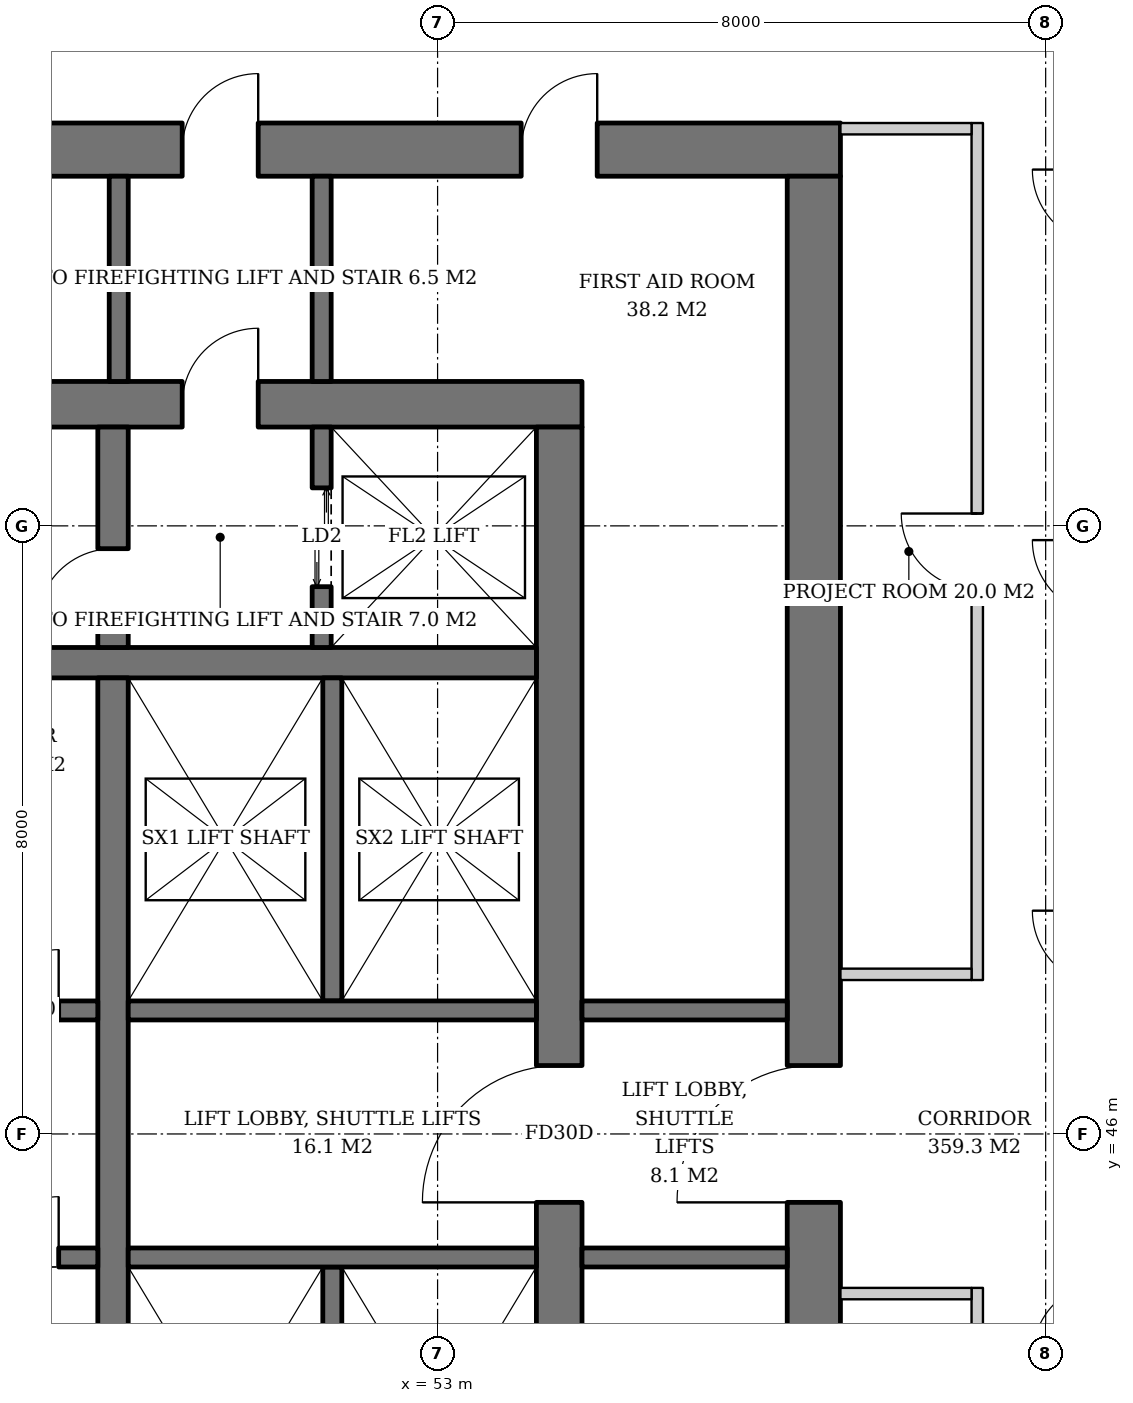
"""IFC4 building model, lengths in metres.
Left out: names, types, materials, properties, quantities, classifications, styles, units other than length and angle.
Written with IfcOpenShell. Run it as: python <this file> out.ifc"""

import sys

from ifc_helpers import new_model, si_unit, direction, frame, frame_2d, origin, place, context, subcontext, project, spatial, rectangle, extrude, element, fill, save


model = new_model("IFC4")
c1 = context("Model", 3, precision=1e-05, world=origin(), true_north=direction((0.0, 1.0)))
c2 = subcontext(c1, "Body", "Model", "MODEL_VIEW")
j1 = project(units=[si_unit("LENGTHUNIT", "METRE"), si_unit("PLANEANGLEUNIT", "RADIAN")], contexts=[c1])
p1 = place(None, origin())
s1 = spatial("IfcSite", under=j1, at=p1, CompositionType="ELEMENT")
p2 = place(p1, origin())
s2 = spatial("IfcBuilding", under=s1, at=p2, CompositionType="ELEMENT")
p3 = place(p2, frame((0.0, 0.0, 93.2)))
s3 = spatial("IfcBuildingStorey", under=s2, at=p3, CompositionType="ELEMENT", Elevation=93.2)
p4 = place(p3, frame((35.1, 55.6, 0.0), z_axis=(0.0, 0.0, 1.0), x_axis=(1.0, 0.0, 0.0)))
e1 = element("IfcWall", 1, at=p4, inside=s3, PredefinedType="SHEAR", context=c2, shape_type="SweptSolid", body=[
    extrude(rectangle(XDim=19.8, YDim=0.6, at=frame_2d((9.9, 0.0))), origin(), (0.0, 0.0, 1.0), 3.8),
])
p5 = place(p4, frame((14.54, 0.0, 0.0)))
e2 = element("IfcOpeningElement", 2, at=p5, cuts=e1, PredefinedType="OPENING", context=c2, shape_type="SweptSolid", body=[
    extrude(rectangle(XDim=1.0, YDim=2.1, at=frame_2d((0.5, 1.05))), frame((0.0, 0.31, 0.0), z_axis=(0.0, -1.0, 0.0), x_axis=(1.0, 0.0, 0.0)), (0.0, 0.0, 1.0), 0.62),
])
p6 = place(p4, frame((2.425, 0.0, 0.0)))
e3 = element("IfcOpeningElement", 3, at=p6, cuts=e1, PredefinedType="OPENING", context=c2, shape_type="SweptSolid", body=[
    extrude(rectangle(XDim=1.0, YDim=2.1, at=frame_2d((0.5, 1.05))), frame((0.0, 0.31, 0.0), z_axis=(0.0, -1.0, 0.0), x_axis=(1.0, 0.0, 0.0)), (0.0, 0.0, 1.0), 0.62),
])
p7 = place(p3, frame((54.6, 36.7, 0.0), z_axis=(0.0, 0.0, 1.0), x_axis=(0.0, 1.0, 0.0)))
e4 = element("IfcWall", 4, at=p7, inside=s3, PredefinedType="SHEAR", context=c2, shape_type="SweptSolid", body=[
    extrude(rectangle(XDim=18.6, YDim=0.6, at=frame_2d((9.3, 0.0))), origin(), (0.0, 0.0, 1.0), 3.8),
])
p8 = place(p7, frame((8.4, 0.0, 0.0)))
e5 = element("IfcOpeningElement", 5, at=p8, cuts=e4, PredefinedType="OPENING", context=c2, shape_type="SweptSolid", body=[
    extrude(rectangle(XDim=1.8, YDim=2.4, at=frame_2d((0.9, 1.2))), frame((0.0, 0.31, 0.0), z_axis=(0.0, -1.0, 0.0), x_axis=(1.0, 0.0, 0.0)), (0.0, 0.0, 1.0), 0.62),
])
p9 = place(p3, frame((31.7, 58.95, 0.0), z_axis=(0.0, 0.0, 1.0), x_axis=(1.0, 0.0, 0.0)))
e6 = element("IfcWall", 6, at=p9, inside=s3, PredefinedType="SHEAR", context=c2, shape_type="SweptSolid", body=[
    extrude(rectangle(XDim=26.6, YDim=0.7, at=frame_2d((13.3, 0.0))), origin(), (0.0, 0.0, 1.0), 3.8),
])
p10 = place(p9, frame((17.94, 0.0, 0.0)))
e7 = element("IfcOpeningElement", 7, at=p10, cuts=e6, PredefinedType="OPENING", context=c2, shape_type="SweptSolid", body=[
    extrude(rectangle(XDim=1.0, YDim=2.1, at=frame_2d((0.5, 1.05))), frame((0.0, 0.36, 0.0), z_axis=(0.0, -1.0, 0.0), x_axis=(1.0, 0.0, 0.0)), (0.0, 0.0, 1.0), 0.72),
])
p11 = place(p9, frame((5.825, 0.0, 0.0)))
e8 = element("IfcOpeningElement", 8, at=p11, cuts=e6, PredefinedType="OPENING", context=c2, shape_type="SweptSolid", body=[
    extrude(rectangle(XDim=1.0, YDim=2.1, at=frame_2d((0.5, 1.05))), frame((0.0, 0.36, 0.0), z_axis=(0.0, -1.0, 0.0), x_axis=(1.0, 0.0, 0.0)), (0.0, 0.0, 1.0), 0.72),
])
p12 = place(p9, frame((2.587, 0.0, 0.0)))
e9 = element("IfcOpeningElement", 9, at=p12, cuts=e6, PredefinedType="OPENING", context=c2, shape_type="SweptSolid", body=[
    extrude(rectangle(XDim=1.0, YDim=2.1, at=frame_2d((0.5, 1.05))), frame((0.0, 0.36, 0.0), z_axis=(0.0, -1.0, 0.0), x_axis=(1.0, 0.0, 0.0)), (0.0, 0.0, 1.0), 0.72),
])
p13 = place(p9, frame((9.126, 0.0, 0.0)))
e10 = element("IfcOpeningElement", 10, at=p13, cuts=e6, PredefinedType="OPENING", context=c2, shape_type="SweptSolid", body=[
    extrude(rectangle(XDim=1.0, YDim=2.1, at=frame_2d((0.5, 1.05))), frame((0.0, 0.36, 0.0), z_axis=(0.0, -1.0, 0.0), x_axis=(1.0, 0.0, 0.0)), (0.0, 0.0, 1.0), 0.72),
])
p14 = place(p9, frame((14.029, 0.0, 0.0)))
e11 = element("IfcOpeningElement", 11, at=p14, cuts=e6, PredefinedType="OPENING", context=c2, shape_type="SweptSolid", body=[
    extrude(rectangle(XDim=1.0, YDim=2.1, at=frame_2d((0.5, 1.05))), frame((0.0, 0.36, 0.0), z_axis=(0.0, -1.0, 0.0), x_axis=(1.0, 0.0, 0.0)), (0.0, 0.0, 1.0), 0.72),
])
p15 = place(p9, frame((22.4, 0.0, 0.0)))
e12 = element("IfcOpeningElement", 12, at=p15, cuts=e6, PredefinedType="OPENING", context=c2, shape_type="SweptSolid", body=[
    extrude(rectangle(XDim=1.0, YDim=2.1, at=frame_2d((0.5, 1.05))), frame((0.0, 0.36, 0.0), z_axis=(0.0, -1.0, 0.0), x_axis=(1.0, 0.0, 0.0)), (0.0, 0.0, 1.0), 0.72),
])
p16 = place(p3, frame((57.95, 33.4, 0.0), z_axis=(0.0, 0.0, 1.0), x_axis=(0.0, 1.0, 0.0)))
e13 = element("IfcWall", 13, at=p16, inside=s3, PredefinedType="SHEAR", context=c2, shape_type="SweptSolid", body=[
    extrude(rectangle(XDim=25.2, YDim=0.7, at=frame_2d((12.6, 0.0))), origin(), (0.0, 0.0, 1.0), 3.8),
])
p17 = place(p16, frame((11.7, 0.0, 0.0)))
e14 = element("IfcOpeningElement", 14, at=p17, cuts=e13, PredefinedType="OPENING", context=c2, shape_type="SweptSolid", body=[
    extrude(rectangle(XDim=1.8, YDim=2.4, at=frame_2d((0.9, 1.2))), frame((0.0, 0.36, 0.0), z_axis=(0.0, -1.0, 0.0), x_axis=(1.0, 0.0, 0.0)), (0.0, 0.0, 1.0), 0.72),
])
p18 = place(p3, frame((35.7, 52.2, 0.0), z_axis=(0.0, 0.0, 1.0), x_axis=(1.0, 0.0, 0.0)))
e15 = element("IfcWall", 15, at=p18, inside=s3, PredefinedType="SHEAR", context=c2, shape_type="SweptSolid", body=[
    extrude(rectangle(XDim=18.6, YDim=0.4, at=frame_2d((9.3, 0.0))), origin(), (0.0, 0.0, 1.0), 3.8),
])
p19 = place(p3, frame((48.73, 40.0, 0.0), z_axis=(0.0, 0.0, 1.0), x_axis=(0.0, 1.0, 0.0)))
e16 = element("IfcWall", 16, at=p19, inside=s3, PredefinedType="SHEAR", context=c2, shape_type="SweptSolid", body=[
    extrude(rectangle(XDim=12.0, YDim=0.4, at=frame_2d((6.0, 0.0))), origin(), (0.0, 0.0, 1.0), 3.8),
])
p20 = place(p3, frame((48.73, 52.4, 0.0), z_axis=(0.0, 0.0, 1.0), x_axis=(0.0, 1.0, 0.0)))
e17 = element("IfcWall", 17, at=p20, inside=s3, PredefinedType="SHEAR", context=c2, shape_type="SweptSolid", body=[
    extrude(rectangle(XDim=2.9, YDim=0.4, at=frame_2d((1.45, 0.0))), origin(), (0.0, 0.0, 1.0), 3.8),
])
p21 = place(p20, frame((0.3, 0.0, 0.0)))
e18 = element("IfcOpeningElement", 18, at=p21, cuts=e17, PredefinedType="OPENING", context=c2, shape_type="SweptSolid", body=[
    extrude(rectangle(XDim=1.0, YDim=2.1, at=frame_2d((0.5, 1.05))), frame((0.0, 0.21, 0.0), z_axis=(0.0, -1.0, 0.0), x_axis=(1.0, 0.0, 0.0)), (0.0, 0.0, 1.0), 0.42),
])
p22 = place(p3, frame((51.475, 52.4, 0.0), z_axis=(0.0, 0.0, 1.0), x_axis=(0.0, 1.0, 0.0)))
e19 = element("IfcWall", 19, at=p22, inside=s3, PredefinedType="SHEAR", context=c2, shape_type="SweptSolid", body=[
    extrude(rectangle(XDim=2.9, YDim=0.25, at=frame_2d((1.45, 0.0))), origin(), (0.0, 0.0, 1.0), 3.8),
])
p23 = place(p22, frame((0.8, 0.0, 0.0)))
e20 = element("IfcOpeningElement", 20, at=p23, cuts=e19, PredefinedType="OPENING", context=c2, shape_type="SweptSolid", body=[
    extrude(rectangle(XDim=1.3, YDim=2.2, at=frame_2d((0.65, 1.1))), frame((0.0, 0.135, 0.0), z_axis=(0.0, -1.0, 0.0), x_axis=(1.0, 0.0, 0.0)), (0.0, 0.0, 1.0), 0.27),
])
p24 = place(p3, frame((35.7, 47.625, 0.0), z_axis=(0.0, 0.0, 1.0), x_axis=(1.0, 0.0, 0.0)))
e21 = element("IfcWall", 21, at=p24, inside=s3, PredefinedType="SHEAR", context=c2, shape_type="SweptSolid", body=[
    extrude(rectangle(XDim=12.83, YDim=0.25, at=frame_2d((6.415, 0.0))), origin(), (0.0, 0.0, 1.0), 3.8),
])
p25 = place(p24, frame((0.7, 0.0, 0.0)))
e22 = element("IfcOpeningElement", 22, at=p25, cuts=e21, PredefinedType="OPENING", context=c2, shape_type="SweptSolid", body=[
    extrude(rectangle(XDim=1.1, YDim=2.2, at=frame_2d((0.55, 1.1))), frame((0.0, 0.135, 0.0), z_axis=(0.0, -1.0, 0.0), x_axis=(1.0, 0.0, 0.0)), (0.0, 0.0, 1.0), 0.27),
])
p26 = place(p24, frame((3.45, 0.0, 0.0)))
e23 = element("IfcOpeningElement", 23, at=p26, cuts=e21, PredefinedType="OPENING", context=c2, shape_type="SweptSolid", body=[
    extrude(rectangle(XDim=1.1, YDim=2.2, at=frame_2d((0.55, 1.1))), frame((0.0, 0.135, 0.0), z_axis=(0.0, -1.0, 0.0), x_axis=(1.0, 0.0, 0.0)), (0.0, 0.0, 1.0), 0.27),
])
p27 = place(p24, frame((6.2, 0.0, 0.0)))
e24 = element("IfcOpeningElement", 24, at=p27, cuts=e21, PredefinedType="OPENING", context=c2, shape_type="SweptSolid", body=[
    extrude(rectangle(XDim=1.1, YDim=2.2, at=frame_2d((0.55, 1.1))), frame((0.0, 0.135, 0.0), z_axis=(0.0, -1.0, 0.0), x_axis=(1.0, 0.0, 0.0)), (0.0, 0.0, 1.0), 0.27),
])
p28 = place(p24, frame((8.95, 0.0, 0.0)))
e25 = element("IfcOpeningElement", 25, at=p28, cuts=e21, PredefinedType="OPENING", context=c2, shape_type="SweptSolid", body=[
    extrude(rectangle(XDim=1.1, YDim=2.2, at=frame_2d((0.55, 1.1))), frame((0.0, 0.135, 0.0), z_axis=(0.0, -1.0, 0.0), x_axis=(1.0, 0.0, 0.0)), (0.0, 0.0, 1.0), 0.27),
])
p29 = place(p24, frame((11.515, 0.0, 0.0)))
e26 = element("IfcOpeningElement", 26, at=p29, cuts=e21, PredefinedType="OPENING", context=c2, shape_type="SweptSolid", body=[
    extrude(rectangle(XDim=0.8, YDim=2.0, at=frame_2d((0.4, 1.0))), frame((0.0, 0.135, 0.0), z_axis=(0.0, -1.0, 0.0), x_axis=(1.0, 0.0, 0.0)), (0.0, 0.0, 1.0), 0.27),
])
p30 = place(p3, frame((35.7, 44.375, 0.0), z_axis=(0.0, 0.0, 1.0), x_axis=(1.0, 0.0, 0.0)))
e27 = element("IfcWall", 27, at=p30, inside=s3, PredefinedType="SHEAR", context=c2, shape_type="SweptSolid", body=[
    extrude(rectangle(XDim=12.83, YDim=0.25, at=frame_2d((6.415, 0.0))), origin(), (0.0, 0.0, 1.0), 3.8),
])
p31 = place(p30, frame((0.7, 0.0, 0.0)))
e28 = element("IfcOpeningElement", 28, at=p31, cuts=e27, PredefinedType="OPENING", context=c2, shape_type="SweptSolid", body=[
    extrude(rectangle(XDim=1.1, YDim=2.2, at=frame_2d((0.55, 1.1))), frame((0.0, 0.135, 0.0), z_axis=(0.0, -1.0, 0.0), x_axis=(1.0, 0.0, 0.0)), (0.0, 0.0, 1.0), 0.27),
])
p32 = place(p30, frame((3.45, 0.0, 0.0)))
e29 = element("IfcOpeningElement", 29, at=p32, cuts=e27, PredefinedType="OPENING", context=c2, shape_type="SweptSolid", body=[
    extrude(rectangle(XDim=1.1, YDim=2.2, at=frame_2d((0.55, 1.1))), frame((0.0, 0.135, 0.0), z_axis=(0.0, -1.0, 0.0), x_axis=(1.0, 0.0, 0.0)), (0.0, 0.0, 1.0), 0.27),
])
p33 = place(p30, frame((6.2, 0.0, 0.0)))
e30 = element("IfcOpeningElement", 30, at=p33, cuts=e27, PredefinedType="OPENING", context=c2, shape_type="SweptSolid", body=[
    extrude(rectangle(XDim=1.1, YDim=2.2, at=frame_2d((0.55, 1.1))), frame((0.0, 0.135, 0.0), z_axis=(0.0, -1.0, 0.0), x_axis=(1.0, 0.0, 0.0)), (0.0, 0.0, 1.0), 0.27),
])
p34 = place(p30, frame((8.95, 0.0, 0.0)))
e31 = element("IfcOpeningElement", 31, at=p34, cuts=e27, PredefinedType="OPENING", context=c2, shape_type="SweptSolid", body=[
    extrude(rectangle(XDim=1.1, YDim=2.2, at=frame_2d((0.55, 1.1))), frame((0.0, 0.135, 0.0), z_axis=(0.0, -1.0, 0.0), x_axis=(1.0, 0.0, 0.0)), (0.0, 0.0, 1.0), 0.27),
])
p35 = place(p30, frame((11.515, 0.0, 0.0)))
e32 = element("IfcOpeningElement", 32, at=p35, cuts=e27, PredefinedType="OPENING", context=c2, shape_type="SweptSolid", body=[
    extrude(rectangle(XDim=0.8, YDim=2.0, at=frame_2d((0.4, 1.0))), frame((0.0, 0.135, 0.0), z_axis=(0.0, -1.0, 0.0), x_axis=(1.0, 0.0, 0.0)), (0.0, 0.0, 1.0), 0.27),
])
p36 = place(p3, frame((51.615, 47.75, 0.0), z_axis=(0.0, 0.0, 1.0), x_axis=(0.0, 1.0, 0.0)))
e33 = element("IfcWall", 33, at=p36, inside=s3, PredefinedType="SHEAR", context=c2, shape_type="SweptSolid", body=[
    extrude(rectangle(XDim=4.25, YDim=0.25, at=frame_2d((2.125, 0.0))), origin(), (0.0, 0.0, 1.0), 3.8),
])
p37 = place(p3, frame((48.93, 47.625, 0.0), z_axis=(0.0, 0.0, 1.0), x_axis=(1.0, 0.0, 0.0)))
e34 = element("IfcWall", 34, at=p37, inside=s3, PredefinedType="SHEAR", context=c2, shape_type="SweptSolid", body=[
    extrude(rectangle(XDim=5.37, YDim=0.25, at=frame_2d((2.685, 0.0))), origin(), (0.0, 0.0, 1.0), 3.8),
])
p38 = place(p3, frame((51.615, 44.25, 0.0), z_axis=(0.0, 0.0, 1.0), x_axis=(0.0, -1.0, 0.0)))
e35 = element("IfcWall", 35, at=p38, inside=s3, PredefinedType="SHEAR", context=c2, shape_type="SweptSolid", body=[
    extrude(rectangle(XDim=4.25, YDim=0.25, at=frame_2d((2.125, 0.0))), origin(), (0.0, 0.0, 1.0), 3.8),
])
p39 = place(p3, frame((48.93, 44.375, 0.0), z_axis=(0.0, 0.0, 1.0), x_axis=(1.0, 0.0, 0.0)))
e36 = element("IfcWall", 36, at=p39, inside=s3, PredefinedType="SHEAR", context=c2, shape_type="SweptSolid", body=[
    extrude(rectangle(XDim=5.37, YDim=0.25, at=frame_2d((2.685, 0.0))), origin(), (0.0, 0.0, 1.0), 3.8),
])
for number, where, z_axis, x_axis in (
    (37, (48.805, 55.9, 0.0), (0.0, 0.0, 1.0), (0.0, 1.0, 0.0)),
    (38, (51.475, 55.9, 0.0), (0.0, 0.0, 1.0), (0.0, 1.0, 0.0)),
    (39, (54.9, 44.375, 0.0), (0.0, 0.0, 1.0), (1.0, 0.0, 0.0)),
    (40, (54.9, 47.625, 0.0), (0.0, 0.0, 1.0), (1.0, 0.0, 0.0)),
):
    element("IfcWall", number, at=place(p3, frame(where, z_axis=z_axis, x_axis=x_axis)), inside=s3, PredefinedType="SOLIDWALL", context=c2, shape_type="SweptSolid", body=[
        extrude(rectangle(XDim=2.7, YDim=0.25, at=frame_2d((1.35, 0.0))), origin(), (0.0, 0.0, 1.0), 3.62),
    ])
p40 = place(p3, frame((60.1, 32.7, 0.0), z_axis=(0.0, 0.0, 1.0), x_axis=(0.0, 1.0, 0.0)))
e41 = element("IfcWall", 41, at=p40, inside=s3, PredefinedType="PARTITIONING", context=c2, shape_type="SweptSolid", body=[
    extrude(rectangle(XDim=11.275, YDim=0.15, at=frame_2d((5.638, 0.0))), origin(), (0.0, 0.0, 1.0), 2.72),
])
p41 = place(p40, frame((5.137, 0.0, 0.0)))
e42 = element("IfcOpeningElement", 42, at=p41, cuts=e41, PredefinedType="OPENING", context=c2, shape_type="SweptSolid", body=[
    extrude(rectangle(XDim=1.0, YDim=2.1, at=frame_2d((0.5, 1.05))), frame((0.0, 0.085, 0.0), z_axis=(0.0, -1.0, 0.0), x_axis=(1.0, 0.0, 0.0)), (0.0, 0.0, 1.0), 0.17),
])
p42 = place(p3, frame((58.3, 43.9, 0.0), z_axis=(0.0, 0.0, 1.0), x_axis=(1.0, 0.0, 0.0)))
e43 = element("IfcWall", 43, at=p42, inside=s3, PredefinedType="PARTITIONING", context=c2, shape_type="SweptSolid", body=[
    extrude(rectangle(XDim=1.725, YDim=0.15, at=frame_2d((0.862, 0.0))), origin(), (0.0, 0.0, 1.0), 3.62),
])
p43 = place(p3, frame((60.1, 48.025, 0.0), z_axis=(0.0, 0.0, 1.0), x_axis=(0.0, 1.0, 0.0)))
e44 = element("IfcWall", 44, at=p43, inside=s3, PredefinedType="PARTITIONING", context=c2, shape_type="SweptSolid", body=[
    extrude(rectangle(XDim=11.275, YDim=0.15, at=frame_2d((5.638, 0.0))), origin(), (0.0, 0.0, 1.0), 2.806),
])
p44 = place(p43, frame((5.137, 0.0, 0.0)))
e45 = element("IfcOpeningElement", 45, at=p44, cuts=e44, PredefinedType="OPENING", context=c2, shape_type="SweptSolid", body=[
    extrude(rectangle(XDim=1.0, YDim=2.1, at=frame_2d((0.5, 1.05))), frame((0.0, 0.085, 0.0), z_axis=(0.0, -1.0, 0.0), x_axis=(1.0, 0.0, 0.0)), (0.0, 0.0, 1.0), 0.17),
])
for number, where, z_axis, x_axis in (
    (46, (58.3, 48.1, 0.0), (0.0, 0.0, 1.0), (1.0, 0.0, 0.0)),
    (47, (58.3, 59.225, 0.0), (0.0, 0.0, 1.0), (1.0, 0.0, 0.0)),
):
    element("IfcWall", number, at=place(p3, frame(where, z_axis=z_axis, x_axis=x_axis)), inside=s3, PredefinedType="PARTITIONING", context=c2, shape_type="SweptSolid", body=[
        extrude(rectangle(XDim=1.725, YDim=0.15, at=frame_2d((0.862, 0.0))), origin(), (0.0, 0.0, 1.0), 3.62),
    ])
p45 = place(p23, origin())
e48 = element("IfcDoor", 48, at=p45, inside=s3, OperationType="DOUBLE_DOOR_SLIDING", PredefinedType="DOOR", context=c2, shape_type="SweptSolid", body=[
    extrude(rectangle(XDim=1.3, YDim=2.2, at=frame_2d((0.65, 1.1))), frame((0.0, 0.025, 0.0), z_axis=(0.0, -1.0, 0.0), x_axis=(1.0, 0.0, 0.0)), (0.0, 0.0, 1.0), 0.05),
])
fill(e20, e48)
p46 = place(p29, origin())
e49 = element("IfcDoor", 49, at=p46, inside=s3, OperationType="SINGLE_SWING_RIGHT", PredefinedType="DOOR", context=c2, shape_type="SweptSolid", body=[
    extrude(rectangle(XDim=0.8, YDim=2.0, at=frame_2d((0.4, 1.0))), frame((0.0, 0.025, 0.0), z_axis=(0.0, -1.0, 0.0), x_axis=(1.0, 0.0, 0.0)), (0.0, 0.0, 1.0), 0.05),
])
fill(e26, e49)
p47 = place(p35, origin())
e50 = element("IfcDoor", 50, at=p47, inside=s3, OperationType="SINGLE_SWING_RIGHT", PredefinedType="DOOR", context=c2, shape_type="SweptSolid", body=[
    extrude(rectangle(XDim=0.8, YDim=2.0, at=frame_2d((0.4, 1.0))), frame((0.0, 0.025, 0.0), z_axis=(0.0, -1.0, 0.0), x_axis=(1.0, 0.0, 0.0)), (0.0, 0.0, 1.0), 0.05),
])
fill(e32, e50)
p48 = place(p21, origin())
e51 = element("IfcDoor", 51, at=p48, inside=s3, OperationType="SINGLE_SWING_LEFT", PredefinedType="DOOR", context=c2, shape_type="SweptSolid", body=[
    extrude(rectangle(XDim=1.0, YDim=2.1, at=frame_2d((0.5, 1.05))), frame((0.0, 0.025, 0.0), z_axis=(0.0, -1.0, 0.0), x_axis=(1.0, 0.0, 0.0)), (0.0, 0.0, 1.0), 0.05),
])
fill(e18, e51)
p49 = place(p5, origin())
e52 = element("IfcDoor", 52, at=p49, inside=s3, OperationType="SINGLE_SWING_RIGHT", PredefinedType="DOOR", context=c2, shape_type="SweptSolid", body=[
    extrude(rectangle(XDim=1.0, YDim=2.1, at=frame_2d((0.5, 1.05))), frame((0.0, 0.025, 0.0), z_axis=(0.0, -1.0, 0.0), x_axis=(1.0, 0.0, 0.0)), (0.0, 0.0, 1.0), 0.05),
])
fill(e2, e52)
p50 = place(p8, origin())
e53 = element("IfcDoor", 53, at=p50, inside=s3, OperationType="DOUBLE_DOOR_SINGLE_SWING", PredefinedType="DOOR", context=c2, shape_type="SweptSolid", body=[
    extrude(rectangle(XDim=1.8, YDim=2.4, at=frame_2d((0.9, 1.2))), frame((0.0, 0.025, 0.0), z_axis=(0.0, -1.0, 0.0), x_axis=(1.0, 0.0, 0.0)), (0.0, 0.0, 1.0), 0.05),
])
fill(e5, e53)
p51 = place(p17, origin())
e54 = element("IfcDoor", 54, at=p51, inside=s3, OperationType="DOUBLE_DOOR_SINGLE_SWING", PredefinedType="DOOR", context=c2, shape_type="SweptSolid", body=[
    extrude(rectangle(XDim=1.8, YDim=2.4, at=frame_2d((0.9, 1.2))), frame((0.0, 0.025, 0.0), z_axis=(0.0, -1.0, 0.0), x_axis=(1.0, 0.0, 0.0)), (0.0, 0.0, 1.0), 0.05),
])
fill(e14, e54)
p52 = place(p10, origin())
e55 = element("IfcDoor", 55, at=p52, inside=s3, OperationType="SINGLE_SWING_RIGHT", PredefinedType="DOOR", context=c2, shape_type="SweptSolid", body=[
    extrude(rectangle(XDim=1.0, YDim=2.1, at=frame_2d((0.5, 1.05))), frame((0.0, 0.025, 0.0), z_axis=(0.0, -1.0, 0.0), x_axis=(1.0, 0.0, 0.0)), (0.0, 0.0, 1.0), 0.05),
])
fill(e7, e55)
p53 = place(p15, origin())
e56 = element("IfcDoor", 56, at=p53, inside=s3, OperationType="SINGLE_SWING_RIGHT", PredefinedType="DOOR", context=c2, shape_type="SweptSolid", body=[
    extrude(rectangle(XDim=1.0, YDim=2.1, at=frame_2d((0.5, 1.05))), frame((0.0, -0.29, 0.0), z_axis=(0.0, -1.0, 0.0), x_axis=(1.0, 0.0, 0.0)), (0.0, 0.0, 1.0), 0.05),
])
fill(e12, e56)
p54 = place(p44, origin())
e57 = element("IfcDoor", 57, at=p54, inside=s3, OperationType="SINGLE_SWING_RIGHT", PredefinedType="DOOR", context=c2, shape_type="SweptSolid", body=[
    extrude(rectangle(XDim=1.0, YDim=2.1, at=frame_2d((0.5, 1.05))), frame((0.0, 0.025, 0.0), z_axis=(0.0, -1.0, 0.0), x_axis=(1.0, 0.0, 0.0)), (0.0, 0.0, 1.0), 0.05),
])
fill(e45, e57)
save(model, sys.argv[1])
